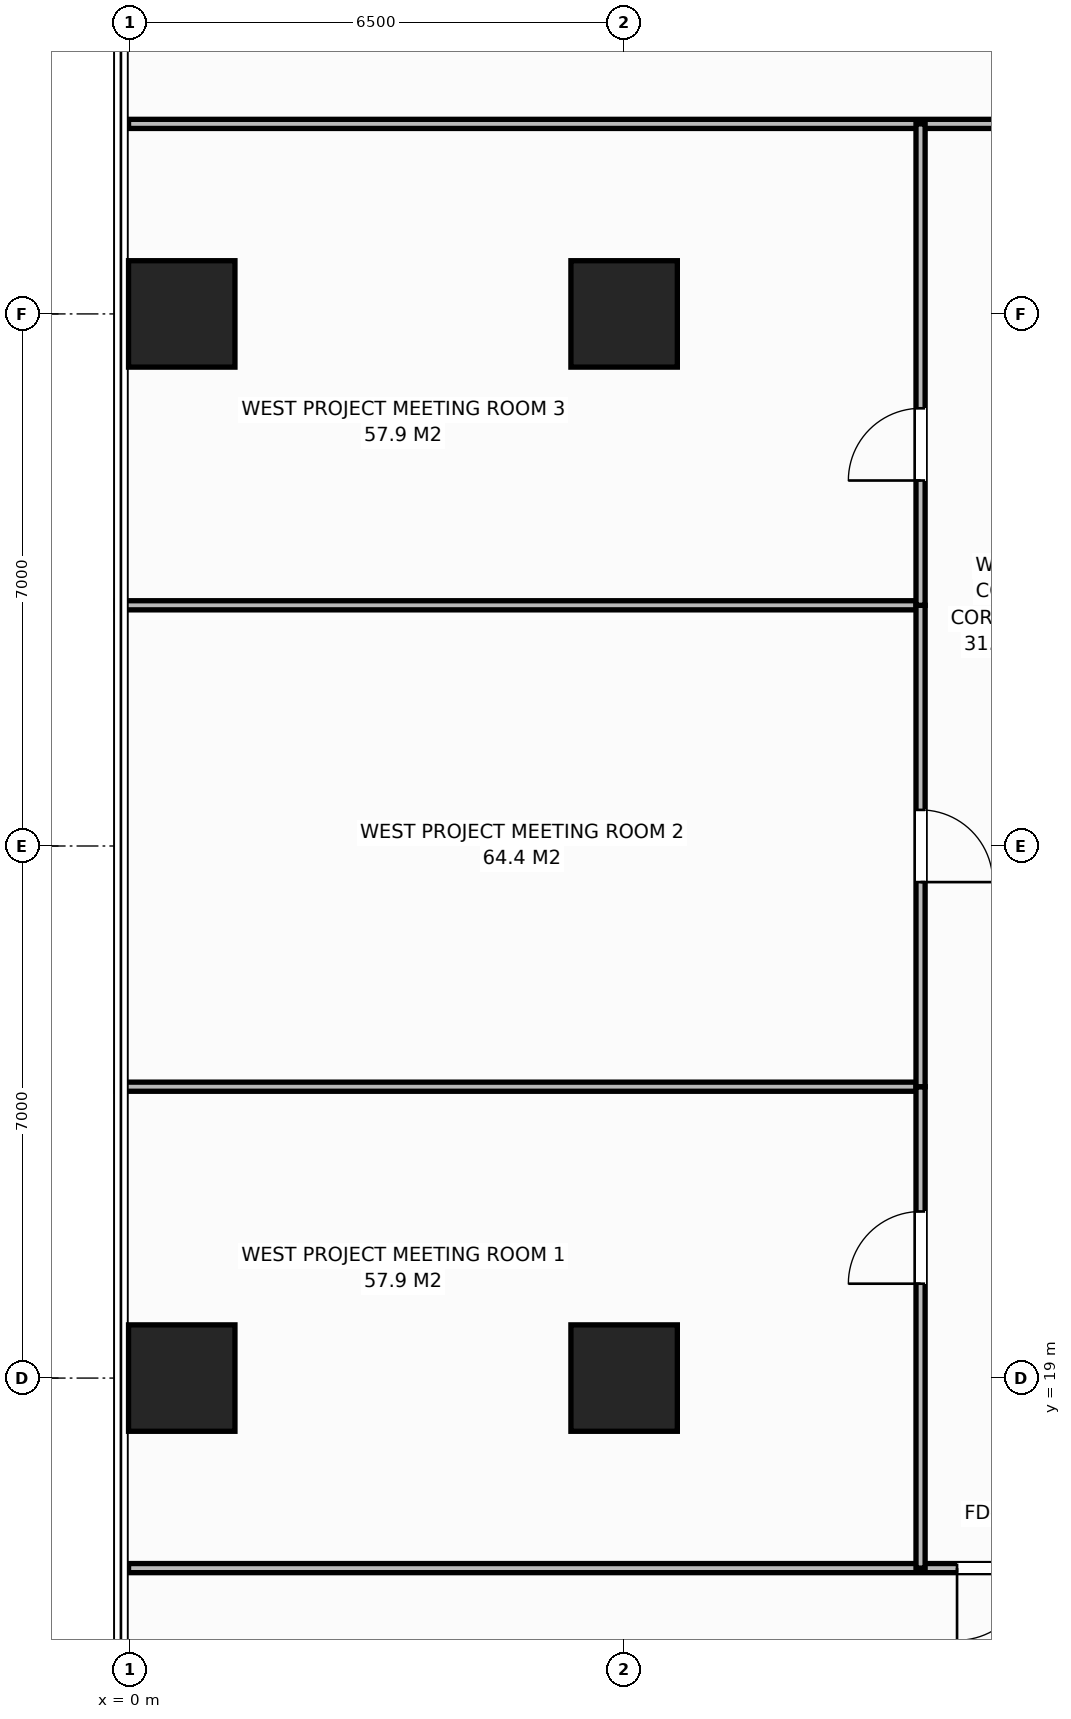
"""IFC4 building model, lengths in metres.
Left out: names, types, materials, properties, quantities, classifications, styles, units other than length and angle.
Written with IfcOpenShell. Run it as: python <this file> out.ifc"""

import sys

from ifc_helpers import new_model, si_unit, direction, frame, frame_2d, origin, origin_2d, place, context, subcontext, project, spatial, rectangle, extrude, element, fill, save


model = new_model("IFC4")
c1 = context("Model", 3, precision=1e-05, world=origin(), true_north=direction((0.0, 1.0)))
c2 = subcontext(c1, "Body", "Model", "MODEL_VIEW")
j1 = project(units=[si_unit("LENGTHUNIT", "METRE"), si_unit("PLANEANGLEUNIT", "RADIAN")], contexts=[c1])
p1 = place(None, origin())
s1 = spatial("IfcSite", under=j1, at=p1, CompositionType="ELEMENT")
p2 = place(p1, origin())
s2 = spatial("IfcBuilding", under=s1, at=p2, CompositionType="ELEMENT")
p3 = place(p2, frame((0.0, 0.0, 54.4)))
s3 = spatial("IfcBuildingStorey", under=s2, at=p3, CompositionType="ELEMENT", Elevation=54.4)
for number, where, z_axis, x_axis in (
    (1, (6.5, 19.0, 0.0), (0.0, 0.0, 1.0), (1.0, 0.0, 0.0)),
    (2, (6.5, 33.0, 0.0), (0.0, 0.0, 1.0), (1.0, 0.0, 0.0)),
    (3, (0.68, 19.0, 0.0), (0.0, 0.0, 1.0), (1.0, 0.0, 0.0)),
    (4, (0.68, 33.0, 0.0), (0.0, 0.0, 1.0), (1.0, 0.0, 0.0)),
):
    element("IfcColumn", number, at=place(p3, frame(where, z_axis=z_axis, x_axis=x_axis)), inside=s3, PredefinedType="COLUMN", context=c2, shape_type="SweptSolid", body=[
        extrude(rectangle(XDim=1.4, YDim=1.4, at=origin_2d()), origin(), (0.0, 0.0, 1.0), 3.8),
    ])
p4 = place(p3, frame((-0.02, 35.5, 0.0), z_axis=(0.0, 0.0, 1.0), x_axis=(1.0, 0.0, 0.0)))
e5 = element("IfcWall", 5, at=p4, inside=s3, PredefinedType="PARTITIONING", context=c2, shape_type="SweptSolid", body=[
    extrude(rectangle(XDim=25.396, YDim=0.12, at=frame_2d((12.698, 0.0))), origin(), (0.0, 0.0, 1.0), 3.55),
])
p5 = place(p4, frame((17.433, 0.0, 0.0)))
e6 = element("IfcOpeningElement", 6, at=p5, cuts=e5, PredefinedType="OPENING", context=c2, shape_type="SweptSolid", body=[
    extrude(rectangle(XDim=0.95, YDim=2.15, at=frame_2d((0.475, 1.075))), frame((0.0, 0.07, 0.0), z_axis=(0.0, -1.0, 0.0), x_axis=(1.0, 0.0, 0.0)), (0.0, 0.0, 1.0), 0.14),
])
p6 = place(p3, frame((-0.02, 16.5, 0.0), z_axis=(0.0, 0.0, 1.0), x_axis=(1.0, 0.0, 0.0)))
e7 = element("IfcWall", 7, at=p6, inside=s3, PredefinedType="PARTITIONING", context=c2, shape_type="SweptSolid", body=[
    extrude(rectangle(XDim=29.041, YDim=0.12, at=frame_2d((14.521, 0.0))), origin(), (0.0, 0.0, 1.0), 3.55),
])
p7 = place(p6, frame((10.9, 0.0, 0.0)))
e8 = element("IfcOpeningElement", 8, at=p7, cuts=e7, PredefinedType="OPENING", context=c2, shape_type="SweptSolid", body=[
    extrude(rectangle(XDim=0.95, YDim=2.15, at=frame_2d((0.475, 1.075))), frame((0.0, 0.07, 0.0), z_axis=(0.0, -1.0, 0.0), x_axis=(1.0, 0.0, 0.0)), (0.0, 0.0, 1.0), 0.14),
])
p8 = place(p3, frame((-0.18, 22.833, 0.0), z_axis=(0.0, 0.0, 1.0), x_axis=(1.0, 0.0, 0.0)))
e9 = element("IfcWall", 9, at=p8, inside=s3, PredefinedType="PARTITIONING", context=c2, shape_type="SweptSolid", body=[
    extrude(rectangle(XDim=10.58, YDim=0.12, at=frame_2d((5.29, 0.0))), origin(), (0.0, 0.0, 1.0), 3.55),
])
p9 = place(p3, frame((10.4, 16.5, 0.0), z_axis=(0.0, 0.0, 1.0), x_axis=(0.0, 1.0, 0.0)))
e10 = element("IfcWall", 10, at=p9, inside=s3, PredefinedType="PARTITIONING", context=c2, shape_type="SweptSolid", body=[
    extrude(rectangle(XDim=6.333, YDim=0.12, at=frame_2d((3.167, 0.0))), origin(), (0.0, 0.0, 1.0), 3.55),
])
p10 = place(p9, frame((3.742, 0.0, 0.0)))
e11 = element("IfcOpeningElement", 11, at=p10, cuts=e10, PredefinedType="OPENING", context=c2, shape_type="SweptSolid", body=[
    extrude(rectangle(XDim=0.95, YDim=2.15, at=frame_2d((0.475, 1.075))), frame((0.0, 0.07, 0.0), z_axis=(0.0, -1.0, 0.0), x_axis=(1.0, 0.0, 0.0)), (0.0, 0.0, 1.0), 0.14),
])
p11 = place(p3, frame((-0.18, 29.167, 0.0), z_axis=(0.0, 0.0, 1.0), x_axis=(1.0, 0.0, 0.0)))
e12 = element("IfcWall", 12, at=p11, inside=s3, PredefinedType="PARTITIONING", context=c2, shape_type="SweptSolid", body=[
    extrude(rectangle(XDim=10.58, YDim=0.12, at=frame_2d((5.29, 0.0))), origin(), (0.0, 0.0, 1.0), 3.55),
])
p12 = place(p3, frame((10.4, 22.833, 0.0), z_axis=(0.0, 0.0, 1.0), x_axis=(0.0, 1.0, 0.0)))
e13 = element("IfcWall", 13, at=p12, inside=s3, PredefinedType="PARTITIONING", context=c2, shape_type="SweptSolid", body=[
    extrude(rectangle(XDim=6.333, YDim=0.12, at=frame_2d((3.167, 0.0))), origin(), (0.0, 0.0, 1.0), 3.55),
])
p13 = place(p12, frame((2.692, 0.0, 0.0)))
e14 = element("IfcOpeningElement", 14, at=p13, cuts=e13, PredefinedType="OPENING", context=c2, shape_type="SweptSolid", body=[
    extrude(rectangle(XDim=0.95, YDim=2.15, at=frame_2d((0.475, 1.075))), frame((0.0, 0.07, 0.0), z_axis=(0.0, -1.0, 0.0), x_axis=(1.0, 0.0, 0.0)), (0.0, 0.0, 1.0), 0.14),
])
p14 = place(p3, frame((10.4, 29.167, 0.0), z_axis=(0.0, 0.0, 1.0), x_axis=(0.0, 1.0, 0.0)))
e15 = element("IfcWall", 15, at=p14, inside=s3, PredefinedType="PARTITIONING", context=c2, shape_type="SweptSolid", body=[
    extrude(rectangle(XDim=6.333, YDim=0.12, at=frame_2d((3.167, 0.0))), origin(), (0.0, 0.0, 1.0), 3.55),
])
p15 = place(p14, frame((1.642, 0.0, 0.0)))
e16 = element("IfcOpeningElement", 16, at=p15, cuts=e15, PredefinedType="OPENING", context=c2, shape_type="SweptSolid", body=[
    extrude(rectangle(XDim=0.95, YDim=2.15, at=frame_2d((0.475, 1.075))), frame((0.0, 0.07, 0.0), z_axis=(0.0, -1.0, 0.0), x_axis=(1.0, 0.0, 0.0)), (0.0, 0.0, 1.0), 0.14),
])
p16 = place(p7, origin())
e17 = element("IfcDoor", 17, at=p16, inside=s3, OperationType="SINGLE_SWING_RIGHT", PredefinedType="DOOR", context=c2, shape_type="SweptSolid", body=[
    extrude(rectangle(XDim=0.95, YDim=2.15, at=frame_2d((0.475, 1.075))), frame((0.0, 0.025, 0.0), z_axis=(0.0, -1.0, 0.0), x_axis=(1.0, 0.0, 0.0)), (0.0, 0.0, 1.0), 0.05),
])
fill(e8, e17)
p17 = place(p10, origin())
e18 = element("IfcDoor", 18, at=p17, inside=s3, OperationType="SINGLE_SWING_LEFT", PredefinedType="DOOR", context=c2, shape_type="SweptSolid", body=[
    extrude(rectangle(XDim=0.95, YDim=2.15, at=frame_2d((0.475, 1.075))), frame((0.0, 0.025, 0.0), z_axis=(0.0, -1.0, 0.0), x_axis=(1.0, 0.0, 0.0)), (0.0, 0.0, 1.0), 0.05),
])
fill(e11, e18)
p18 = place(p13, origin())
e19 = element("IfcDoor", 19, at=p18, inside=s3, OperationType="SINGLE_SWING_RIGHT", PredefinedType="DOOR", context=c2, shape_type="SweptSolid", body=[
    extrude(rectangle(XDim=0.95, YDim=2.15, at=frame_2d((0.475, 1.075))), frame((0.0, 0.025, 0.0), z_axis=(0.0, -1.0, 0.0), x_axis=(1.0, 0.0, 0.0)), (0.0, 0.0, 1.0), 0.05),
])
fill(e14, e19)
p19 = place(p15, origin())
e20 = element("IfcDoor", 20, at=p19, inside=s3, OperationType="SINGLE_SWING_LEFT", PredefinedType="DOOR", context=c2, shape_type="SweptSolid", body=[
    extrude(rectangle(XDim=0.95, YDim=2.15, at=frame_2d((0.475, 1.075))), frame((0.0, 0.025, 0.0), z_axis=(0.0, -1.0, 0.0), x_axis=(1.0, 0.0, 0.0)), (0.0, 0.0, 1.0), 0.05),
])
fill(e16, e20)
save(model, sys.argv[1])
